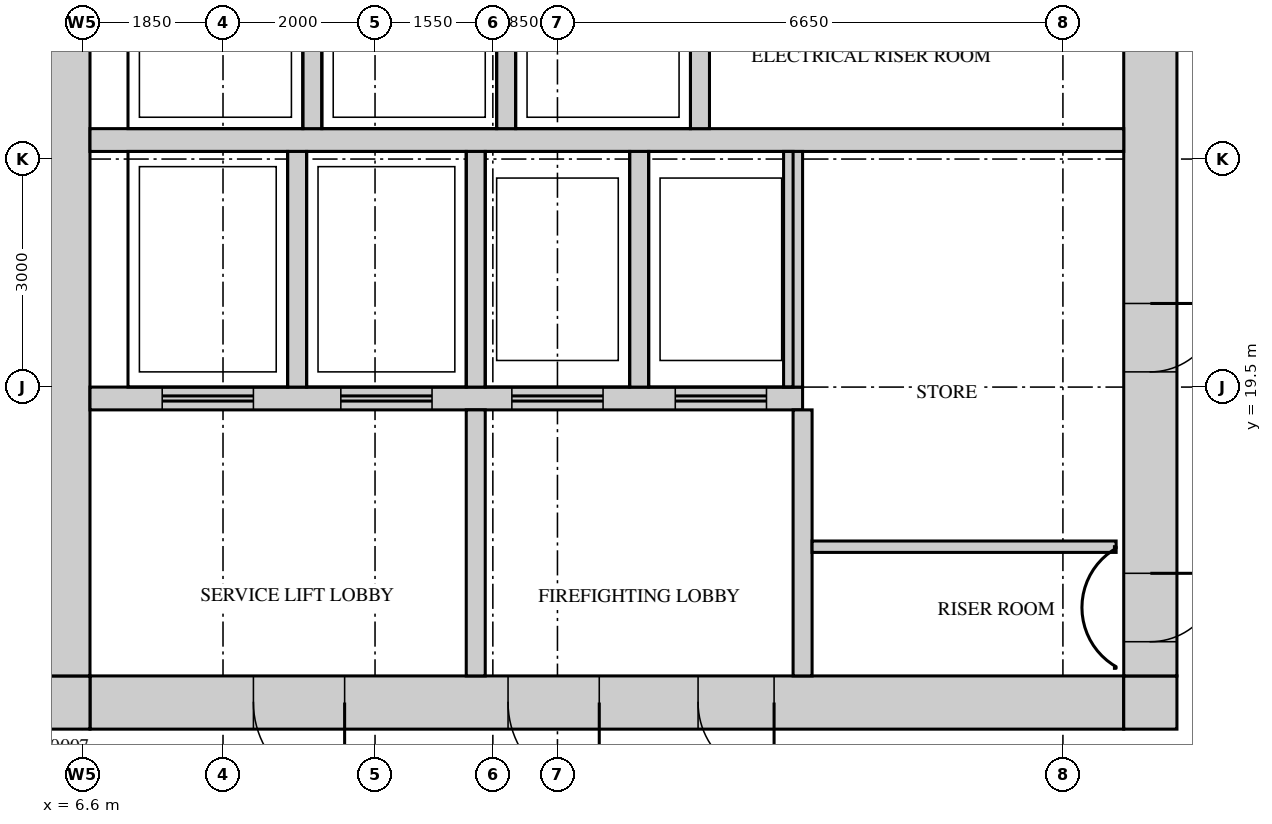
"""IFC4 building model, lengths in metres.
Left out: names, types, materials, properties, quantities, classifications, styles, units other than length and angle.
Written with IfcOpenShell. Run it as: python <this file> out.ifc"""

import sys

from ifc_helpers import new_model, si_unit, direction, frame, frame_2d, origin, place, context, subcontext, project, spatial, rectangle, extrude, source, transform, mapped, element, fill, save


model = new_model("IFC4")
c1 = context("Model", 3, precision=1e-05, world=origin(), true_north=direction((0.0, 1.0)))
c2 = subcontext(c1, "Body", "Model", "MODEL_VIEW")
j1 = project(units=[si_unit("LENGTHUNIT", "METRE"), si_unit("PLANEANGLEUNIT", "RADIAN")], contexts=[c1])
p1 = place(None, origin())
s1 = spatial("IfcSite", under=j1, at=p1, CompositionType="ELEMENT")
p2 = place(p1, origin())
s2 = spatial("IfcBuilding", under=s1, at=p2, CompositionType="ELEMENT")
p3 = place(p2, frame((0.0, 0.0, 270.2)))
s3 = spatial("IfcBuildingStorey", under=s2, at=p3, CompositionType="ELEMENT", Elevation=270.2)
m1 = source(origin(), c2, "Body", "SweptSolid", [
    extrude(rectangle(XDim=13.6, YDim=0.7, at=frame_2d((6.8, 0.0))), origin(), (0.0, 0.0, 1.0), 3.75),
])
p4 = place(p3, frame((6.7, 15.35, 0.0), z_axis=(0.0, 0.0, 1.0), x_axis=(1.0, 0.0, 0.0)))
e1 = element("IfcWall", 1, at=p4, inside=s3, PredefinedType="SHEAR", context=c2, shape_type="MappedRepresentation", body=[
    mapped(m1, transform((0.0, 0.0, 0.0))),
])
m2 = source(origin(), c2, "Body", "SweptSolid", [
    extrude(rectangle(XDim=1.2, YDim=2.1, at=frame_2d((0.6, 1.05))), frame((0.0, 0.36, 0.0), z_axis=(0.0, -1.0, 0.0), x_axis=(1.0, 0.0, 0.0)), (0.0, 0.0, 1.0), 0.72),
])
p5 = place(p4, frame((5.5, 0.0, 0.0)))
e2 = element("IfcOpeningElement", 2, at=p5, cuts=e1, PredefinedType="OPENING", context=c2, shape_type="MappedRepresentation", body=[
    mapped(m2, transform((0.0, 0.0, 0.0))),
])
p6 = place(p4, frame((2.15, 0.0, 0.0)))
e3 = element("IfcOpeningElement", 3, at=p6, cuts=e1, PredefinedType="OPENING", context=c2, shape_type="MappedRepresentation", body=[
    mapped(m2, transform((0.0, 0.0, 0.0))),
])
m3 = source(origin(), c2, "Body", "SweptSolid", [
    extrude(rectangle(XDim=1.0, YDim=2.1, at=frame_2d((0.5, 1.05))), frame((0.0, 0.36, 0.0), z_axis=(0.0, -1.0, 0.0), x_axis=(1.0, 0.0, 0.0)), (0.0, 0.0, 1.0), 0.72),
])
p7 = place(p4, frame((8.0, 0.0, 0.0)))
e4 = element("IfcOpeningElement", 4, at=p7, cuts=e1, PredefinedType="OPENING", context=c2, shape_type="MappedRepresentation", body=[
    mapped(m3, transform((0.0, 0.0, 0.0))),
])
m4 = source(origin(), c2, "Body", "SweptSolid", [
    extrude(rectangle(XDim=0.7, YDim=0.7, at=frame_2d((0.35, 0.0))), origin(), (0.0, 0.0, 1.0), 3.75),
])
for number, where, z_axis, x_axis in (
    (5, (20.3, 15.35, 0.0), (0.0, 0.0, 1.0), (1.0, 0.0, 0.0)),
    (6, (6.0, 15.35, 0.0), (0.0, 0.0, 1.0), (1.0, 0.0, 0.0)),
):
    element("IfcWall", number, at=place(p3, frame(where, z_axis=z_axis, x_axis=x_axis)), inside=s3, PredefinedType="SHEAR", context=c2, shape_type="MappedRepresentation", body=[
        mapped(m4, transform((0.0, 0.0, 0.0))),
    ])
m5 = source(origin(), c2, "Body", "SweptSolid", [
    extrude(rectangle(XDim=22.6, YDim=0.7, at=frame_2d((11.3, 0.0))), origin(), (0.0, 0.0, 1.0), 3.75),
])
p8 = place(p3, frame((20.65, 15.7, 0.0), z_axis=(0.0, 0.0, 1.0), x_axis=(0.0, 1.0, 0.0)))
e7 = element("IfcWall", 7, at=p8, inside=s3, PredefinedType="SHEAR", context=c2, shape_type="MappedRepresentation", body=[
    mapped(m5, transform((0.0, 0.0, 0.0))),
])
m6 = source(origin(), c2, "Body", "SweptSolid", [
    extrude(rectangle(XDim=1.8, YDim=2.1, at=frame_2d((0.9, 1.05))), frame((0.0, 0.36, 0.0), z_axis=(0.0, -1.0, 0.0), x_axis=(1.0, 0.0, 0.0)), (0.0, 0.0, 1.0), 0.72),
])
p9 = place(p8, frame((10.8, 0.0, 0.0)))
e8 = element("IfcOpeningElement", 8, at=p9, cuts=e7, PredefinedType="OPENING", context=c2, shape_type="MappedRepresentation", body=[
    mapped(m6, transform((0.0, 0.0, 0.0))),
])
m7 = source(origin(), c2, "Body", "SweptSolid", [
    extrude(rectangle(XDim=0.9, YDim=2.1, at=frame_2d((0.45, 1.05))), frame((0.0, 0.36, 0.0), z_axis=(0.0, -1.0, 0.0), x_axis=(1.0, 0.0, 0.0)), (0.0, 0.0, 1.0), 0.72),
])
p10 = place(p8, frame((0.45, 0.0, 0.0)))
e9 = element("IfcOpeningElement", 9, at=p10, cuts=e7, PredefinedType="OPENING", context=c2, shape_type="MappedRepresentation", body=[
    mapped(m7, transform((0.0, 0.0, 0.0))),
])
p11 = place(p8, frame((4.0, 0.0, 0.0)))
e10 = element("IfcOpeningElement", 10, at=p11, cuts=e7, PredefinedType="OPENING", context=c2, shape_type="MappedRepresentation", body=[
    mapped(m7, transform((0.0, 0.0, 0.0))),
])
p12 = place(p3, frame((6.35, 15.7, 0.0), z_axis=(0.0, 0.0, 1.0), x_axis=(0.0, 1.0, 0.0)))
e11 = element("IfcWall", 11, at=p12, inside=s3, PredefinedType="SHEAR", context=c2, shape_type="MappedRepresentation", body=[
    mapped(m5, transform((0.0, 0.0, 0.0))),
])
m8 = source(origin(), c2, "Body", "SweptSolid", [
    extrude(rectangle(XDim=13.6, YDim=0.3, at=frame_2d((6.8, 0.0))), origin(), (0.0, 0.0, 1.0), 3.75),
])
p13 = place(p3, frame((6.7, 22.75, 0.0), z_axis=(0.0, 0.0, 1.0), x_axis=(1.0, 0.0, 0.0)))
e12 = element("IfcWall", 12, at=p13, inside=s3, PredefinedType="STANDARD", context=c2, shape_type="MappedRepresentation", body=[
    mapped(m8, transform((0.0, 0.0, 0.0))),
])
m9 = source(origin(), c2, "Body", "SweptSolid", [
    extrude(rectangle(XDim=9.375, YDim=0.3, at=frame_2d((4.688, 0.0))), origin(), (0.0, 0.0, 1.0), 3.75),
])
p14 = place(p3, frame((6.7, 19.35, 0.0), z_axis=(0.0, 0.0, 1.0), x_axis=(1.0, 0.0, 0.0)))
e13 = element("IfcWall", 13, at=p14, inside=s3, PredefinedType="STANDARD", context=c2, shape_type="MappedRepresentation", body=[
    mapped(m9, transform((0.0, 0.0, 0.0))),
])
m10 = source(origin(), c2, "Body", "SweptSolid", [
    extrude(rectangle(XDim=1.2, YDim=2.1, at=frame_2d((0.6, 1.05))), frame((0.0, 0.16, 0.0), z_axis=(0.0, -1.0, 0.0), x_axis=(1.0, 0.0, 0.0)), (0.0, 0.0, 1.0), 0.32),
])
p15 = place(p14, frame((0.95, 0.0, 0.0)))
e14 = element("IfcOpeningElement", 14, at=p15, cuts=e13, PredefinedType="OPENING", context=c2, shape_type="MappedRepresentation", body=[
    mapped(m10, transform((0.0, 0.0, 0.0))),
])
p16 = place(p14, frame((3.3, 0.0, 0.0)))
e15 = element("IfcOpeningElement", 15, at=p16, cuts=e13, PredefinedType="OPENING", context=c2, shape_type="MappedRepresentation", body=[
    mapped(m10, transform((0.0, 0.0, 0.0))),
])
p17 = place(p14, frame((5.55, 0.0, 0.0)))
e16 = element("IfcOpeningElement", 16, at=p17, cuts=e13, PredefinedType="OPENING", context=c2, shape_type="MappedRepresentation", body=[
    mapped(m10, transform((0.0, 0.0, 0.0))),
])
p18 = place(p14, frame((7.7, 0.0, 0.0)))
e17 = element("IfcOpeningElement", 17, at=p18, cuts=e13, PredefinedType="OPENING", context=c2, shape_type="MappedRepresentation", body=[
    mapped(m10, transform((0.0, 0.0, 0.0))),
])
m11 = source(origin(), c2, "Body", "SweptSolid", [
    extrude(rectangle(XDim=3.1, YDim=0.25, at=frame_2d((1.55, 0.0))), origin(), (0.0, 0.0, 1.0), 3.75),
])
for number, where, z_axis, x_axis in (
    (18, (9.425, 19.5, 0.0), (0.0, 0.0, 1.0), (0.0, 1.0, 0.0)),
    (19, (11.775, 19.5, 0.0), (0.0, 0.0, 1.0), (0.0, 1.0, 0.0)),
    (20, (13.925, 19.5, 0.0), (0.0, 0.0, 1.0), (0.0, 1.0, 0.0)),
    (21, (15.95, 19.5, 0.0), (0.0, 0.0, 1.0), (0.0, 1.0, 0.0)),
):
    element("IfcWall", number, at=place(p3, frame(where, z_axis=z_axis, x_axis=x_axis)), inside=s3, PredefinedType="STANDARD", context=c2, shape_type="MappedRepresentation", body=[
        mapped(m11, transform((0.0, 0.0, 0.0))),
    ])
m12 = source(origin(), c2, "Body", "SweptSolid", [
    extrude(rectangle(XDim=2.4, YDim=0.25, at=frame_2d((1.2, 0.0))), origin(), (0.0, 0.0, 1.0), 3.75),
])
for number, where, z_axis, x_axis in (
    (22, (9.625, 22.9, 0.0), (0.0, 0.0, 1.0), (0.0, 1.0, 0.0)),
    (23, (12.175, 22.9, 0.0), (0.0, 0.0, 1.0), (0.0, 1.0, 0.0)),
    (24, (14.725, 22.9, 0.0), (0.0, 0.0, 1.0), (0.0, 1.0, 0.0)),
):
    element("IfcWall", number, at=place(p3, frame(where, z_axis=z_axis, x_axis=x_axis)), inside=s3, PredefinedType="STANDARD", context=c2, shape_type="MappedRepresentation", body=[
        mapped(m12, transform((0.0, 0.0, 0.0))),
    ])
m13 = source(origin(), c2, "Body", "SweptSolid", [
    extrude(rectangle(XDim=3.5, YDim=0.25, at=frame_2d((1.75, 0.0))), origin(), (0.0, 0.0, 1.0), 3.75),
])
for number, where, z_axis, x_axis in (
    (25, (16.075, 15.7, 0.0), (0.0, 0.0, 1.0), (0.0, 1.0, 0.0)),
    (26, (11.775, 15.7, 0.0), (0.0, 0.0, 1.0), (0.0, 1.0, 0.0)),
):
    element("IfcWall", number, at=place(p3, frame(where, z_axis=z_axis, x_axis=x_axis)), inside=s3, PredefinedType="STANDARD", context=c2, shape_type="MappedRepresentation", body=[
        mapped(m13, transform((0.0, 0.0, 0.0))),
    ])
m14 = source(origin(), c2, "Body", "SweptSolid", [
    extrude(rectangle(XDim=4.0, YDim=0.15, at=frame_2d((2.0, 0.0))), origin(), (0.0, 0.0, 1.0), 3.8),
])
p19 = place(p3, frame((16.2, 17.4, 0.0), z_axis=(0.0, 0.0, 1.0), x_axis=(1.0, 0.0, 0.0)))
e27 = element("IfcWall", 27, at=p19, inside=s3, PredefinedType="PARTITIONING", context=c2, shape_type="MappedRepresentation", body=[
    mapped(m14, transform((0.0, 0.0, 0.0))),
])
m15 = source(origin(), c2, "Body", "SweptSolid", [
    extrude(rectangle(XDim=0.9, YDim=2.1, at=frame_2d((0.45, 1.05))), frame((0.0, 0.3, 0.0), z_axis=(0.0, -1.0, 0.0), x_axis=(1.0, 0.0, 0.0)), (0.0, 0.0, 1.0), 0.6),
])
p20 = place(p10, origin())
e28 = element("IfcDoor", 28, at=p20, inside=s3, OperationType="SINGLE_SWING_RIGHT", PredefinedType="DOOR", context=c2, shape_type="MappedRepresentation", body=[
    mapped(m15, transform((0.0, 0.0, 0.0))),
])
fill(e9, e28)
p21 = place(p11, origin())
e29 = element("IfcDoor", 29, at=p21, inside=s3, OperationType="SINGLE_SWING_RIGHT", PredefinedType="DOOR", context=c2, shape_type="MappedRepresentation", body=[
    mapped(m15, transform((0.0, 0.0, 0.0))),
])
fill(e10, e29)
m16 = source(origin(), c2, "Body", "SweptSolid", [
    extrude(rectangle(XDim=1.2, YDim=2.1, at=frame_2d((0.6, 1.05))), frame((0.0, 0.3, 0.0), z_axis=(0.0, -1.0, 0.0), x_axis=(1.0, 0.0, 0.0)), (0.0, 0.0, 1.0), 0.6),
])
p22 = place(p5, origin())
e30 = element("IfcDoor", 30, at=p22, inside=s3, OperationType="SINGLE_SWING_RIGHT", PredefinedType="DOOR", context=c2, shape_type="MappedRepresentation", body=[
    mapped(m16, transform((0.0, 0.0, 0.0))),
])
fill(e2, e30)
p23 = place(p6, origin())
e31 = element("IfcDoor", 31, at=p23, inside=s3, OperationType="SINGLE_SWING_RIGHT", PredefinedType="DOOR", context=c2, shape_type="MappedRepresentation", body=[
    mapped(m16, transform((0.0, 0.0, 0.0))),
])
fill(e3, e31)
m17 = source(origin(), c2, "Body", "SweptSolid", [
    extrude(rectangle(XDim=1.0, YDim=2.1, at=frame_2d((0.5, 1.05))), frame((0.0, 0.3, 0.0), z_axis=(0.0, -1.0, 0.0), x_axis=(1.0, 0.0, 0.0)), (0.0, 0.0, 1.0), 0.6),
])
p24 = place(p7, origin())
e32 = element("IfcDoor", 32, at=p24, inside=s3, OperationType="SINGLE_SWING_RIGHT", PredefinedType="DOOR", context=c2, shape_type="MappedRepresentation", body=[
    mapped(m17, transform((0.0, 0.0, 0.0))),
])
fill(e4, e32)
m18 = source(origin(), c2, "Body", "SweptSolid", [
    extrude(rectangle(XDim=1.2, YDim=2.1, at=frame_2d((0.6, 1.05))), frame((0.0, 0.025, 0.0), z_axis=(0.0, -1.0, 0.0), x_axis=(1.0, 0.0, 0.0)), (0.0, 0.0, 1.0), 0.05),
])
p25 = place(p15, origin())
e33 = element("IfcDoor", 33, at=p25, inside=s3, OperationType="DOUBLE_DOOR_SLIDING", PredefinedType="DOOR", context=c2, shape_type="MappedRepresentation", body=[
    mapped(m18, transform((0.0, 0.0, 0.0))),
])
fill(e14, e33)
p26 = place(p16, origin())
e34 = element("IfcDoor", 34, at=p26, inside=s3, OperationType="DOUBLE_DOOR_SLIDING", PredefinedType="DOOR", context=c2, shape_type="MappedRepresentation", body=[
    mapped(m18, transform((0.0, 0.0, 0.0))),
])
fill(e15, e34)
p27 = place(p17, origin())
e35 = element("IfcDoor", 35, at=p27, inside=s3, OperationType="DOUBLE_DOOR_SLIDING", PredefinedType="DOOR", context=c2, shape_type="MappedRepresentation", body=[
    mapped(m18, transform((0.0, 0.0, 0.0))),
])
fill(e16, e35)
p28 = place(p18, origin())
e36 = element("IfcDoor", 36, at=p28, inside=s3, OperationType="DOUBLE_DOOR_SLIDING", PredefinedType="DOOR", context=c2, shape_type="MappedRepresentation", body=[
    mapped(m18, transform((0.0, 0.0, 0.0))),
])
fill(e17, e36)
save(model, sys.argv[1])
